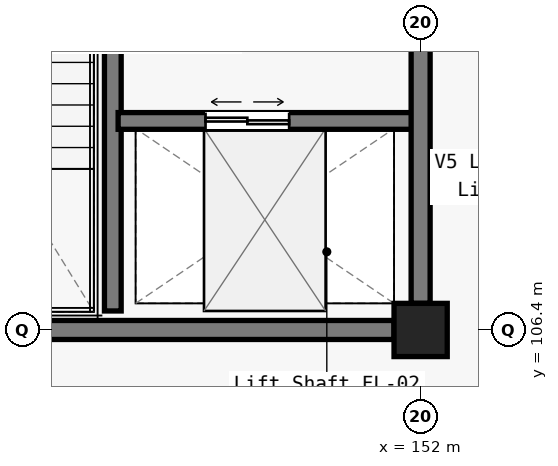
"""IFC4 building model, lengths in metres.
Left out: names, types, materials, properties, quantities, classifications, styles, units other than length and angle.
Written with IfcOpenShell. Run it as: python <this file> out.ifc"""

import sys

from ifc_helpers import new_model, si_unit, direction, frame, frame_2d, origin, origin_2d, place, context, subcontext, project, spatial, rectangle, extrude, element, fill, save


model = new_model("IFC4")
c1 = context("Model", 3, precision=1e-05, world=origin(), true_north=direction((0.0, 1.0)))
c2 = subcontext(c1, "Body", "Model", "MODEL_VIEW")
j1 = project(units=[si_unit("LENGTHUNIT", "METRE"), si_unit("PLANEANGLEUNIT", "RADIAN")], contexts=[c1])
p1 = place(None, origin())
s1 = spatial("IfcSite", under=j1, at=p1, CompositionType="ELEMENT")
p2 = place(p1, origin())
s2 = spatial("IfcBuilding", under=s1, at=p2, CompositionType="ELEMENT")
p3 = place(p2, frame((0.0, 0.0, 10.2)))
s3 = spatial("IfcBuildingStorey", under=s2, at=p3, CompositionType="ELEMENT", Elevation=10.2)
p4 = place(p3, frame((152.0, 106.4, 0.0), z_axis=(0.0, 0.0, 1.0), x_axis=(1.0, 0.0, 0.0)))
e1 = element("IfcColumn", 1, at=p4, inside=s3, PredefinedType="COLUMN", context=c2, shape_type="SweptSolid", body=[
    extrude(rectangle(XDim=0.7, YDim=0.7, at=origin_2d()), origin(), (0.0, 0.0, 1.0), 4.8),
])
p5 = place(p3, frame((144.4, 106.4, 0.0), z_axis=(0.0, 0.0, 1.0), x_axis=(1.0, 0.0, 0.0)))
e2 = element("IfcWall", 2, at=p5, inside=s3, PredefinedType="SOLIDWALL", context=c2, shape_type="SweptSolid", body=[
    extrude(rectangle(XDim=7.25, YDim=0.25, at=frame_2d((3.625, 0.0))), origin(), (0.0, 0.0, 1.0), 3.56),
])
p6 = place(p3, frame((147.95, 106.65, 0.0), z_axis=(0.0, 0.0, 1.0), x_axis=(0.0, 1.0, 0.0)))
e3 = element("IfcWall", 3, at=p6, inside=s3, PredefinedType="SOLIDWALL", context=c2, shape_type="SweptSolid", body=[
    extrude(rectangle(XDim=7.1, YDim=0.22, at=frame_2d((3.55, 0.0))), origin(), (0.0, 0.0, 1.0), 4.52),
])
p7 = place(p6, frame((5.55, 0.0, 0.0)))
e4 = element("IfcOpeningElement", 4, at=p7, cuts=e3, PredefinedType="OPENING", context=c2, shape_type="SweptSolid", body=[
    extrude(rectangle(XDim=1.2, YDim=2.15, at=frame_2d((0.6, 1.075))), frame((0.0, 0.12, 0.0), z_axis=(0.0, -1.0, 0.0), x_axis=(1.0, 0.0, 0.0)), (0.0, 0.0, 1.0), 0.24),
])
p8 = place(p3, frame((148.02, 109.15, 0.0), z_axis=(0.0, 0.0, 1.0), x_axis=(1.0, 0.0, 0.0)))
e5 = element("IfcWall", 5, at=p8, inside=s3, PredefinedType="SOLIDWALL", context=c2, shape_type="SweptSolid", body=[
    extrude(rectangle(XDim=3.93, YDim=0.22, at=frame_2d((1.965, 0.0))), origin(), (0.0, 0.0, 1.0), 3.87),
])
p9 = place(p8, frame((1.15, 0.0, 0.0)))
e6 = element("IfcOpeningElement", 6, at=p9, cuts=e5, PredefinedType="OPENING", context=c2, shape_type="SweptSolid", body=[
    extrude(rectangle(XDim=1.1, YDim=2.2, at=frame_2d((0.55, 1.1))), frame((0.0, 0.12, 0.0), z_axis=(0.0, -1.0, 0.0), x_axis=(1.0, 0.0, 0.0)), (0.0, 0.0, 1.0), 0.24),
])
p10 = place(p3, frame((152.0, 106.75, 0.0), z_axis=(0.0, 0.0, 1.0), x_axis=(0.0, 1.0, 0.0)))
e7 = element("IfcWall", 7, at=p10, inside=s3, PredefinedType="SOLIDWALL", context=c2, shape_type="SweptSolid", body=[
    extrude(rectangle(XDim=6.8, YDim=0.25, at=frame_2d((3.4, 0.0))), origin(), (0.0, 0.0, 1.0), 3.76),
])
p11 = place(p10, frame((3.5, 0.0, 0.0)))
e8 = element("IfcOpeningElement", 8, at=p11, cuts=e7, PredefinedType="OPENING", context=c2, shape_type="SweptSolid", body=[
    extrude(rectangle(XDim=1.35, YDim=2.2, at=frame_2d((0.675, 1.1))), frame((0.0, 0.135, 0.0), z_axis=(0.0, -1.0, 0.0), x_axis=(1.0, 0.0, 0.0)), (0.0, 0.0, 1.0), 0.27),
])
p12 = place(p9, origin())
e9 = element("IfcDoor", 9, at=p12, inside=s3, OperationType="DOUBLE_DOOR_SLIDING", PredefinedType="DOOR", context=c2, shape_type="SweptSolid", body=[
    extrude(rectangle(XDim=1.1, YDim=2.2, at=frame_2d((0.55, 1.1))), frame((0.0, 0.025, 0.0), z_axis=(0.0, -1.0, 0.0), x_axis=(1.0, 0.0, 0.0)), (0.0, 0.0, 1.0), 0.05),
])
fill(e6, e9)
save(model, sys.argv[1])
